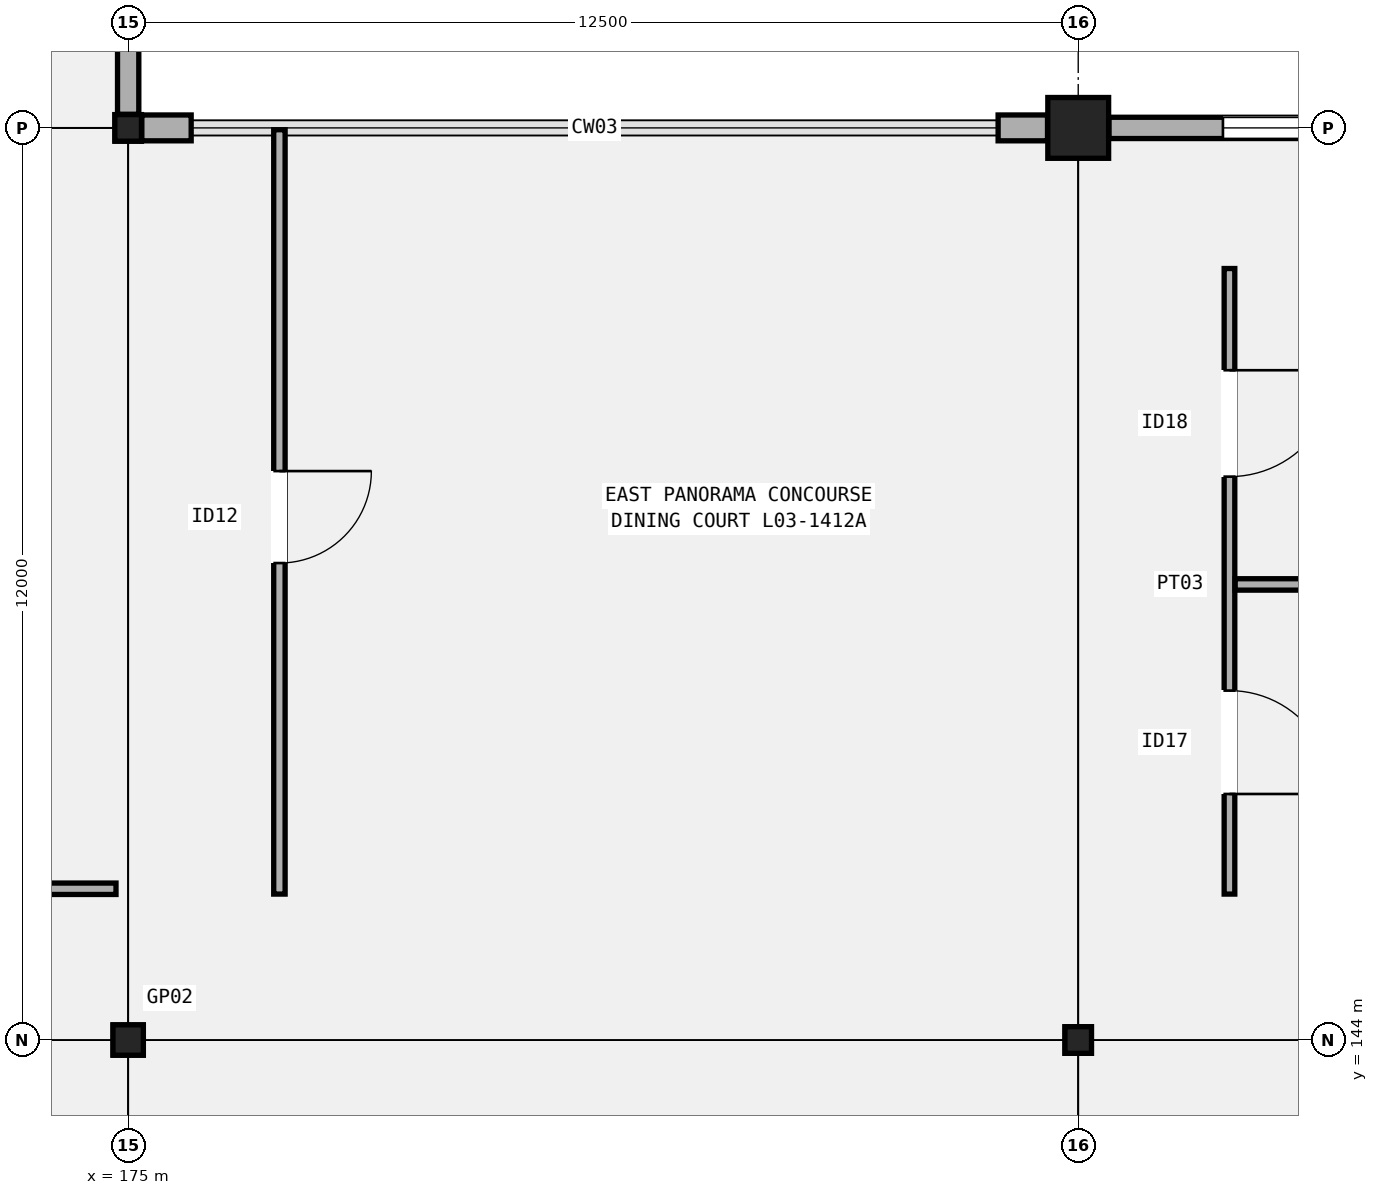
"""IFC4 building model, lengths in metres.
Left out: names, types, materials, properties, quantities, classifications, styles, units other than length and angle.
Written with IfcOpenShell. Run it as: python <this file> out.ifc"""

import sys

from ifc_helpers import new_model, si_unit, direction, frame, frame_2d, origin, origin_2d, place, context, subcontext, project, spatial, rectangle, hollow_rectangle, extrude, element, fill, save


model = new_model("IFC4")
c1 = context("Model", 3, precision=1e-05, world=origin(), true_north=direction((0.0, 1.0)))
c2 = subcontext(c1, "Body", "Model", "MODEL_VIEW")
j1 = project(units=[si_unit("LENGTHUNIT", "METRE"), si_unit("PLANEANGLEUNIT", "RADIAN")], contexts=[c1])
p1 = place(None, origin())
s1 = spatial("IfcSite", under=j1, at=p1, CompositionType="ELEMENT")
p2 = place(p1, origin())
s2 = spatial("IfcBuilding", under=s1, at=p2, CompositionType="ELEMENT")
p3 = place(p2, frame((0.0, 0.0, 15.3)))
s3 = spatial("IfcBuildingStorey", under=s2, at=p3, CompositionType="ELEMENT", Elevation=15.3)
p4 = place(p3, frame((175.0, 144.0, 0.0), z_axis=(0.0, 0.0, 1.0), x_axis=(1.0, 0.0, 0.0)))
e1 = element("IfcColumn", 1, at=p4, inside=s3, PredefinedType="COLUMN", context=c2, shape_type="SweptSolid", body=[
    extrude(hollow_rectangle(XDim=0.4, YDim=0.4, WallThickness=0.016, InnerFilletRadius=0.016, OuterFilletRadius=0.032, at=origin_2d()), origin(), (0.0, 0.0, 1.0), 5.1),
])
for number, where, z_axis, x_axis in (
    (2, (175.0, 156.0, 0.0), (0.0, 0.0, 1.0), (1.0, 0.0, 0.0)),
    (3, (187.5, 144.0, 0.0), (0.0, 0.0, 1.0), (1.0, 0.0, 0.0)),
):
    element("IfcColumn", number, at=place(p3, frame(where, z_axis=z_axis, x_axis=x_axis)), inside=s3, PredefinedType="COLUMN", context=c2, shape_type="SweptSolid", body=[
        extrude(hollow_rectangle(XDim=0.35, YDim=0.35, WallThickness=0.016, InnerFilletRadius=0.016, OuterFilletRadius=0.032, at=origin_2d()), origin(), (0.0, 0.0, 1.0), 5.1),
    ])
p5 = place(p3, frame((187.5, 156.0, 0.0), z_axis=(0.0, 0.0, 1.0), x_axis=(1.0, 0.0, 0.0)))
e4 = element("IfcColumn", 4, at=p5, inside=s3, PredefinedType="COLUMN", context=c2, shape_type="SweptSolid", body=[
    extrude(rectangle(XDim=0.8, YDim=0.8, at=origin_2d()), origin(), (0.0, 0.0, 1.0), 5.1),
])
p6 = place(p3, frame((175.0, 156.179, 0.0), z_axis=(0.0, 0.0, 1.0), x_axis=(0.0, 1.0, 0.0)))
e5 = element("IfcWall", 5, at=p6, inside=s3, PredefinedType="SOLIDWALL", context=c2, shape_type="SweptSolid", body=[
    extrude(rectangle(XDim=11.417, YDim=0.28, at=frame_2d((5.708, 0.0))), origin(), (0.0, 0.0, 1.0), 4.06),
])
p7 = place(p6, frame((2.441, 0.0, 0.95)))
e6 = element("IfcOpeningElement", 6, at=p7, cuts=e5, PredefinedType="OPENING", context=c2, shape_type="SweptSolid", body=[
    extrude(rectangle(XDim=2.25, YDim=1.8, at=frame_2d((1.125, 0.9))), frame((0.0, 0.15, 0.0), z_axis=(0.0, -1.0, 0.0), x_axis=(1.0, 0.0, 0.0)), (0.0, 0.0, 1.0), 0.3),
])
p8 = place(p3, frame((175.179, 156.0, 0.0), z_axis=(0.0, 0.0, 1.0), x_axis=(1.0, 0.0, 0.0)))
e7 = element("IfcWall", 7, at=p8, inside=s3, PredefinedType="SOLIDWALL", context=c2, shape_type="SweptSolid", body=[
    extrude(rectangle(XDim=0.65, YDim=0.34, at=frame_2d((0.325, 0.0))), origin(), (0.0, 0.0, 1.0), 4.06),
])
p9 = place(p3, frame((186.446, 156.0, 0.0), z_axis=(0.0, 0.0, 1.0), x_axis=(1.0, 0.0, 0.0)))
e8 = element("IfcWall", 8, at=p9, inside=s3, PredefinedType="SOLIDWALL", context=c2, shape_type="SweptSolid", body=[
    extrude(rectangle(XDim=0.65, YDim=0.34, at=frame_2d((0.325, 0.0))), origin(), (0.0, 0.0, 1.0), 4.06),
])
p10 = place(p3, frame((187.904, 156.0, 0.0), z_axis=(0.0, 0.0, 1.0), x_axis=(1.0, 0.0, 0.0)))
e9 = element("IfcWall", 9, at=p10, inside=s3, PredefinedType="SOLIDWALL", context=c2, shape_type="SweptSolid", body=[
    extrude(rectangle(XDim=11.742, YDim=0.28, at=frame_2d((5.871, 0.0))), origin(), (0.0, 0.0, 1.0), 4.16),
])
p11 = place(p10, frame((1.5, 0.0, 0.95)))
e10 = element("IfcOpeningElement", 10, at=p11, cuts=e9, PredefinedType="OPENING", context=c2, shape_type="SweptSolid", body=[
    extrude(rectangle(XDim=3.6, YDim=2.15, at=frame_2d((1.8, 1.075))), frame((0.0, 0.15, 0.0), z_axis=(0.0, -1.0, 0.0), x_axis=(1.0, 0.0, 0.0)), (0.0, 0.0, 1.0), 0.3),
])
p12 = place(p3, frame((162.66, 145.99, 0.0), z_axis=(0.0, 0.0, 1.0), x_axis=(1.0, 0.0, 0.0)))
e11 = element("IfcWall", 11, at=p12, inside=s3, PredefinedType="PARTITIONING", context=c2, shape_type="SweptSolid", body=[
    extrude(rectangle(XDim=12.18, YDim=0.15, at=frame_2d((6.09, 0.0))), origin(), (0.0, 0.0, 1.0), 4.22),
])
p13 = place(p12, frame((5.615, 0.0, 0.0)))
e12 = element("IfcOpeningElement", 12, at=p13, cuts=e11, PredefinedType="OPENING", context=c2, shape_type="SweptSolid", body=[
    extrude(rectangle(XDim=0.95, YDim=2.12, at=frame_2d((0.475, 1.06))), frame((0.0, 0.085, 0.0), z_axis=(0.0, -1.0, 0.0), x_axis=(1.0, 0.0, 0.0)), (0.0, 0.0, 1.0), 0.17),
])
p14 = place(p3, frame((176.99, 145.92, 0.0), z_axis=(0.0, 0.0, 1.0), x_axis=(0.0, 1.0, 0.0)))
e13 = element("IfcWall", 13, at=p14, inside=s3, PredefinedType="PARTITIONING", context=c2, shape_type="SweptSolid", body=[
    extrude(rectangle(XDim=10.056, YDim=0.15, at=frame_2d((5.028, 0.0))), origin(), (0.0, 0.0, 1.0), 2.77),
])
p15 = place(p14, frame((5.565, 0.0, 0.0), z_axis=(0.0, 0.0, 1.0), x_axis=(-1.0, 0.0, 0.0)))
e14 = element("IfcOpeningElement", 14, at=p15, cuts=e13, PredefinedType="OPENING", context=c2, shape_type="SweptSolid", body=[
    extrude(rectangle(XDim=1.21, YDim=2.18, at=frame_2d((0.605, 1.09))), frame((0.0, 0.085, 0.0), z_axis=(0.0, -1.0, 0.0), x_axis=(1.0, 0.0, 0.0)), (0.0, 0.0, 1.0), 0.17),
])
p16 = place(p3, frame((189.49, 145.92, 0.0), z_axis=(0.0, 0.0, 1.0), x_axis=(0.0, 1.0, 0.0)))
e15 = element("IfcWall", 15, at=p16, inside=s3, PredefinedType="PARTITIONING", context=c2, shape_type="SweptSolid", body=[
    extrude(rectangle(XDim=8.23, YDim=0.14, at=frame_2d((4.115, 0.0))), origin(), (0.0, 0.0, 1.0), 4.22),
])
p17 = place(p16, frame((2.677, 0.0, 0.0), z_axis=(0.0, 0.0, 1.0), x_axis=(-1.0, 0.0, 0.0)))
e16 = element("IfcOpeningElement", 16, at=p17, cuts=e15, PredefinedType="OPENING", context=c2, shape_type="SweptSolid", body=[
    extrude(rectangle(XDim=1.36, YDim=2.25, at=frame_2d((0.68, 1.125))), frame((0.0, 0.08, 0.0), z_axis=(0.0, -1.0, 0.0), x_axis=(1.0, 0.0, 0.0)), (0.0, 0.0, 1.0), 0.16),
])
p18 = place(p16, frame((6.892, 0.0, 0.0), z_axis=(0.0, 0.0, 1.0), x_axis=(-1.0, 0.0, 0.0)))
e17 = element("IfcOpeningElement", 17, at=p18, cuts=e15, PredefinedType="OPENING", context=c2, shape_type="SweptSolid", body=[
    extrude(rectangle(XDim=1.4, YDim=2.24, at=frame_2d((0.7, 1.12))), frame((0.0, 0.08, 0.0), z_axis=(0.0, -1.0, 0.0), x_axis=(1.0, 0.0, 0.0)), (0.0, 0.0, 1.0), 0.16),
])
p19 = place(p3, frame((189.565, 149.994, 0.0), z_axis=(0.0, 0.0, 1.0), x_axis=(1.0, 0.0, 0.0)))
e18 = element("IfcWall", 18, at=p19, inside=s3, PredefinedType="PARTITIONING", context=c2, shape_type="SweptSolid", body=[
    extrude(rectangle(XDim=8.685, YDim=0.15, at=frame_2d((4.343, 0.0))), origin(), (0.0, 0.0, 1.0), 4.22),
])
p20 = place(p11, origin())
e19 = element("IfcWindow", 19, at=p20, inside=s3, PartitioningType="SINGLE_PANEL", PredefinedType="WINDOW", context=c2, shape_type="SweptSolid", body=[
    extrude(rectangle(XDim=3.6, YDim=2.15, at=frame_2d((1.8, 1.075))), frame((0.0, 0.03, 0.0), z_axis=(0.0, -1.0, 0.0), x_axis=(1.0, 0.0, 0.0)), (0.0, 0.0, 1.0), 0.06),
])
fill(e10, e19)
p21 = place(p15, origin())
e20 = element("IfcDoor", 20, at=p21, inside=s3, OperationType="SINGLE_SWING_LEFT", PredefinedType="DOOR", context=c2, shape_type="SweptSolid", body=[
    extrude(rectangle(XDim=1.21, YDim=2.18, at=frame_2d((0.605, 1.09))), frame((0.0, 0.025, 0.0), z_axis=(0.0, -1.0, 0.0), x_axis=(1.0, 0.0, 0.0)), (0.0, 0.0, 1.0), 0.05),
])
fill(e14, e20)
p22 = place(p17, origin())
e21 = element("IfcDoor", 21, at=p22, inside=s3, OperationType="SINGLE_SWING_RIGHT", PredefinedType="DOOR", context=c2, shape_type="SweptSolid", body=[
    extrude(rectangle(XDim=1.36, YDim=2.25, at=frame_2d((0.68, 1.125))), frame((0.0, 0.025, 0.0), z_axis=(0.0, -1.0, 0.0), x_axis=(1.0, 0.0, 0.0)), (0.0, 0.0, 1.0), 0.05),
])
fill(e16, e21)
p23 = place(p18, origin())
e22 = element("IfcDoor", 22, at=p23, inside=s3, OperationType="SINGLE_SWING_LEFT", PredefinedType="DOOR", context=c2, shape_type="SweptSolid", body=[
    extrude(rectangle(XDim=1.4, YDim=2.24, at=frame_2d((0.7, 1.12))), frame((0.0, 0.025, 0.0), z_axis=(0.0, -1.0, 0.0), x_axis=(1.0, 0.0, 0.0)), (0.0, 0.0, 1.0), 0.05),
])
fill(e17, e22)
save(model, sys.argv[1])
